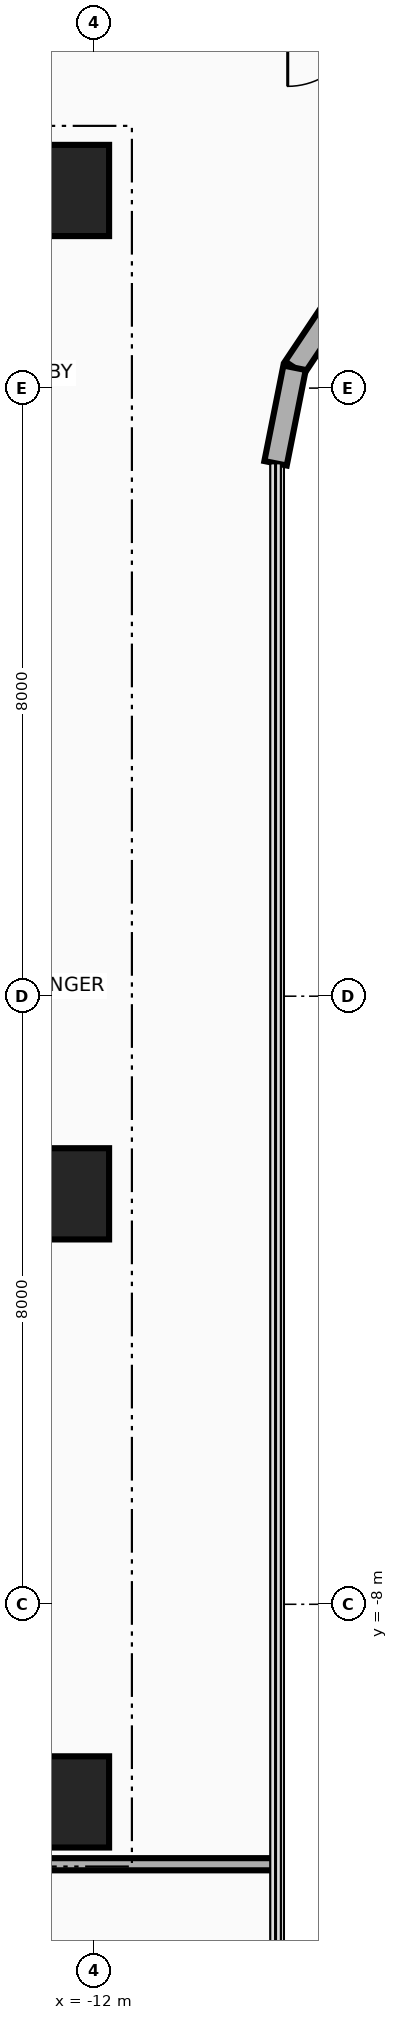
"""IFC4 building model, lengths in metres.
Left out: names, types, materials, properties, quantities, classifications, styles, units other than length and angle.
Written with IfcOpenShell. Run it as: python <this file> out.ifc"""

import sys

from ifc_helpers import new_model, si_unit, direction, frame, frame_2d, origin, origin_2d, place, context, subcontext, project, spatial, rectangle, extrude, source, transform, mapped, element, save


model = new_model("IFC4")
c1 = context("Model", 3, precision=1e-05, world=origin(), true_north=direction((0.0, 1.0)))
c2 = subcontext(c1, "Body", "Model", "MODEL_VIEW")
j1 = project(units=[si_unit("LENGTHUNIT", "METRE"), si_unit("PLANEANGLEUNIT", "RADIAN")], contexts=[c1])
p1 = place(None, origin())
s1 = spatial("IfcSite", under=j1, at=p1, CompositionType="ELEMENT")
p2 = place(p1, origin())
s2 = spatial("IfcBuilding", under=s1, at=p2, CompositionType="ELEMENT")
p3 = place(p2, frame((0.0, 0.0, 113.1)))
s3 = spatial("IfcBuildingStorey", under=s2, at=p3, CompositionType="ELEMENT", Elevation=113.1)
for number, where, z_axis, x_axis in (
    (1, (-22.65, 10.8, 0.0), (0.0, 0.0, 1.0), (1.0, 0.0, 0.0)),
    (2, (-22.65, -10.8, 0.0), (0.0, 0.0, 1.0), (1.0, 0.0, 0.0)),
):
    element("IfcWall", number, at=place(p3, frame(where, z_axis=z_axis, x_axis=x_axis)), inside=s3, PredefinedType="SHEAR", context=c2, shape_type="SweptSolid", body=[
        extrude(rectangle(XDim=10.25, YDim=0.7, at=frame_2d((5.125, 0.0))), origin(), (0.0, 0.0, 1.0), 3.46),
    ])
m1 = source(origin(), c2, "Body", "SweptSolid", [
    extrude(rectangle(XDim=1.2, YDim=1.2, at=origin_2d()), origin(), (0.0, 0.0, 1.0), 3.7),
])
for number, where, z_axis, x_axis in (
    (3, (-12.4, -10.6, 0.0), (0.0, 0.0, 1.0), (1.0, 0.0, 0.0)),
    (4, (-12.4, -2.6, 0.0), (0.0, 0.0, 1.0), (1.0, 0.0, 0.0)),
    (5, (-12.4, 10.6, 0.0), (0.0, 0.0, 1.0), (1.0, 0.0, 0.0)),
):
    element("IfcColumn", number, at=place(p3, frame(where, z_axis=z_axis, x_axis=x_axis)), inside=s3, PredefinedType="COLUMN", context=c2, shape_type="MappedRepresentation", body=[
        mapped(m1, transform((0.0, 0.0, 0.0), x_axis=(1.0, 0.0, 0.0), y_axis=(0.0, 1.0, 0.0), z_axis=(0.0, 0.0, 1.0), scale=1.0)),
    ])
p4 = place(p3, frame((-8.642, 9.342, 0.0), z_axis=(0.0, 0.0, 1.0), x_axis=(-0.555615398575, -0.831439431869, 0.0)))
e6 = element("IfcWall", 6, at=p4, inside=s3, PredefinedType="SOLIDWALL", context=c2, shape_type="SweptSolid", body=[
    extrude(rectangle(XDim=1.292, YDim=0.3, at=frame_2d((0.646, 0.0))), origin(), (0.0, 0.0, 1.0), 3.46),
])
p5 = place(p3, frame((-9.36, 8.268, 0.0), z_axis=(0.0, 0.0, 1.0), x_axis=(-0.195090163074, -0.980785312019, 0.0)))
e7 = element("IfcWall", 7, at=p5, inside=s3, PredefinedType="SOLIDWALL", context=c2, shape_type="SweptSolid", body=[
    extrude(rectangle(XDim=1.281, YDim=0.3, at=frame_2d((0.641, 0.0))), origin(), (0.0, 0.0, 1.0), 3.46),
])
p6 = place(p3, frame((-23.45, -11.42, 0.0), z_axis=(0.0, 0.0, 1.0), x_axis=(1.0, 0.0, 0.0)))
e8 = element("IfcWall", 8, at=p6, inside=s3, PredefinedType="PARTITIONING", context=c2, shape_type="SweptSolid", body=[
    extrude(rectangle(XDim=13.84, YDim=0.16, at=frame_2d((6.92, 0.0))), origin(), (0.0, 0.0, 1.0), 2.834),
])
save(model, sys.argv[1])
